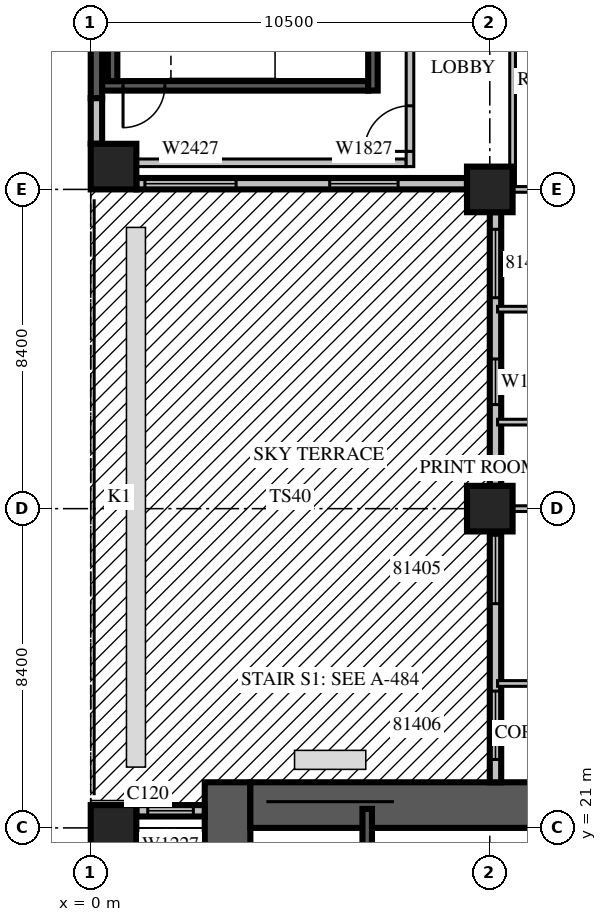
"""IFC4 building model, lengths in metres.
Left out: names, types, materials, properties, quantities, classifications, styles, units other than length and angle.
Written with IfcOpenShell. Run it as: python <this file> out.ifc"""

import sys

from ifc_helpers import new_model, si_unit, direction, frame, frame_2d, origin, origin_2d, place, context, subcontext, project, spatial, rectangle, extrude, source, transform, mapped, element, fill, save


model = new_model("IFC4")
c1 = context("Model", 3, precision=1e-05, world=origin(), true_north=direction((0.0, 1.0)))
c2 = subcontext(c1, "Body", "Model", "MODEL_VIEW")
j1 = project(units=[si_unit("LENGTHUNIT", "METRE"), si_unit("PLANEANGLEUNIT", "RADIAN")], contexts=[c1])
p1 = place(None, origin())
s1 = spatial("IfcSite", under=j1, at=p1, CompositionType="ELEMENT")
p2 = place(p1, origin())
s2 = spatial("IfcBuilding", under=s1, at=p2, CompositionType="ELEMENT")
p3 = place(p2, frame((0.0, 0.0, 69.9)))
s3 = spatial("IfcBuildingStorey", under=s2, at=p3, CompositionType="ELEMENT", Elevation=69.9)
m1 = source(origin(), c2, "Body", "SweptSolid", [
    extrude(rectangle(XDim=1.2, YDim=1.2, at=origin_2d()), origin(), (0.0, 0.0, 1.0), 4.2),
])
for number, where, z_axis, x_axis in (
    (1, (0.6, 21.0, 0.0), (0.0, 0.0, 1.0), (1.0, 0.0, 0.0)),
    (2, (10.5, 29.4, 0.0), (0.0, 0.0, 1.0), (1.0, 0.0, 0.0)),
    (3, (0.6, 38.4, 0.0), (0.0, 0.0, 1.0), (1.0, 0.0, 0.0)),
    (4, (10.5, 37.8, 0.0), (0.0, 0.0, 1.0), (1.0, 0.0, 0.0)),
):
    element("IfcColumn", number, at=place(p3, frame(where, z_axis=z_axis, x_axis=x_axis)), inside=s3, PredefinedType="COLUMN", context=c2, shape_type="MappedRepresentation", body=[
        mapped(m1, transform((0.0, 0.0, 0.0), scale=1.0)),
    ])
m2 = source(origin(), c2, "Body", "SweptSolid", [
    extrude(rectangle(XDim=18.0, YDim=1.2, at=frame_2d((9.0, 0.0))), origin(), (0.0, 0.0, 1.0), 4.2),
])
p4 = place(p3, frame((3.6, 4.2, 0.0), z_axis=(0.0, 0.0, 1.0), x_axis=(0.0, 1.0, 0.0)))
e5 = element("IfcWall", 5, at=p4, inside=s3, PredefinedType="SHEAR", context=c2, shape_type="MappedRepresentation", body=[
    mapped(m2, transform((0.0, 0.0, 0.0), scale=1.0)),
])
m3 = source(origin(), c2, "Body", "SweptSolid", [
    extrude(rectangle(XDim=2.2, YDim=2.1, at=frame_2d((1.1, 1.05))), frame((0.0, 0.61, 0.0), z_axis=(0.0, -1.0, 0.0), x_axis=(1.0, 0.0, 0.0)), (0.0, 0.0, 1.0), 1.22),
])
p5 = place(p4, frame((4.2, 0.0, 0.0)))
e6 = element("IfcOpeningElement", 6, at=p5, cuts=e5, PredefinedType="OPENING", context=c2, shape_type="MappedRepresentation", body=[
    mapped(m3, transform((0.0, 0.0, 0.0), scale=1.0)),
])
m4 = source(origin(), c2, "Body", "SweptSolid", [
    extrude(rectangle(XDim=16.8, YDim=1.2, at=frame_2d((8.4, 0.0))), origin(), (0.0, 0.0, 1.0), 4.2),
])
p6 = place(p3, frame((4.2, 21.6, 0.0), z_axis=(0.0, 0.0, 1.0), x_axis=(1.0, 0.0, 0.0)))
e7 = element("IfcWall", 7, at=p6, inside=s3, PredefinedType="SHEAR", context=c2, shape_type="MappedRepresentation", body=[
    mapped(m4, transform((0.0, 0.0, 0.0), scale=1.0)),
])
m5 = source(origin(), c2, "Body", "SweptSolid", [
    extrude(rectangle(XDim=1.2, YDim=2.1, at=frame_2d((0.6, 1.05))), frame((0.0, 0.61, 0.0), z_axis=(0.0, -1.0, 0.0), x_axis=(1.0, 0.0, 0.0)), (0.0, 0.0, 1.0), 1.22),
])
p7 = place(p6, frame((7.4, 0.0, 0.0)))
e8 = element("IfcOpeningElement", 8, at=p7, cuts=e7, PredefinedType="OPENING", context=c2, shape_type="MappedRepresentation", body=[
    mapped(m5, transform((0.0, 0.0, 0.0), scale=1.0)),
])
m6 = source(origin(), c2, "Body", "SweptSolid", [
    extrude(rectangle(XDim=3.8, YDim=0.3, at=frame_2d((1.9, 0.0))), origin(), (0.0, 0.0, 1.0), 3.8),
])
p8 = place(p3, frame((0.15, 44.0, 0.0), z_axis=(0.0, 0.0, 1.0), x_axis=(0.0, -1.0, 0.0)))
e9 = element("IfcWall", 9, at=p8, inside=s3, PredefinedType="SOLIDWALL", context=c2, shape_type="MappedRepresentation", body=[
    mapped(m6, transform((0.0, 0.0, 0.0), scale=1.0)),
])
m7 = source(origin(), c2, "Body", "SweptSolid", [
    extrude(rectangle(XDim=1.2, YDim=0.3, at=frame_2d((0.6, 0.0))), origin(), (0.0, 0.0, 1.0), 3.8),
])
p9 = place(p3, frame((0.15, 40.2, 0.0), z_axis=(0.0, 0.0, 1.0), x_axis=(0.0, -1.0, 0.0)))
e10 = element("IfcWall", 10, at=p9, inside=s3, PredefinedType="STANDARD", context=c2, shape_type="MappedRepresentation", body=[
    mapped(m7, transform((0.0, 0.0, 0.0), scale=1.0)),
])
m8 = source(origin(), c2, "Body", "SweptSolid", [
    extrude(rectangle(XDim=8.7, YDim=0.3, at=frame_2d((4.35, 0.0))), origin(), (0.0, 0.0, 1.0), 3.8),
])
p10 = place(p3, frame((1.2, 37.95, 0.0), z_axis=(0.0, 0.0, 1.0), x_axis=(1.0, 0.0, 0.0)))
e11 = element("IfcWall", 11, at=p10, inside=s3, PredefinedType="STANDARD", context=c2, shape_type="MappedRepresentation", body=[
    mapped(m8, transform((0.0, 0.0, 0.0), scale=1.0)),
])
m9 = source(origin(), c2, "Body", "SweptSolid", [
    extrude(rectangle(XDim=2.4, YDim=2.7, at=frame_2d((1.2, 1.35))), frame((0.0, 0.16, 0.0), z_axis=(0.0, -1.0, 0.0), x_axis=(1.0, 0.0, 0.0)), (0.0, 0.0, 1.0), 0.32),
])
p11 = place(p10, frame((0.225, 0.0, 0.6)))
e12 = element("IfcOpeningElement", 12, at=p11, cuts=e11, PredefinedType="OPENING", context=c2, shape_type="MappedRepresentation", body=[
    mapped(m9, transform((0.0, 0.0, 0.0), scale=1.0)),
])
m10 = source(origin(), c2, "Body", "SweptSolid", [
    extrude(rectangle(XDim=1.8, YDim=2.7, at=frame_2d((0.9, 1.35))), frame((0.0, 0.16, 0.0), z_axis=(0.0, -1.0, 0.0), x_axis=(1.0, 0.0, 0.0)), (0.0, 0.0, 1.0), 0.32),
])
p12 = place(p10, frame((5.088, 0.0, 0.6)))
e13 = element("IfcOpeningElement", 13, at=p12, cuts=e11, PredefinedType="OPENING", context=c2, shape_type="MappedRepresentation", body=[
    mapped(m10, transform((0.0, 0.0, 0.0), scale=1.0)),
])
m11 = source(origin(), c2, "Body", "SweptSolid", [
    extrude(rectangle(XDim=7.2, YDim=0.3, at=frame_2d((3.6, 0.0))), origin(), (0.0, 0.0, 1.0), 3.8),
])
p13 = place(p3, frame((10.65, 37.2, 0.0), z_axis=(0.0, 0.0, 1.0), x_axis=(0.0, -1.0, 0.0)))
e14 = element("IfcWall", 14, at=p13, inside=s3, PredefinedType="STANDARD", context=c2, shape_type="MappedRepresentation", body=[
    mapped(m11, transform((0.0, 0.0, 0.0), scale=1.0)),
])
m12 = source(origin(), c2, "Body", "SweptSolid", [
    extrude(rectangle(XDim=1.8, YDim=2.4, at=frame_2d((0.9, 1.2))), frame((0.0, 0.16, 0.0), z_axis=(0.0, -1.0, 0.0), x_axis=(1.0, 0.0, 0.0)), (0.0, 0.0, 1.0), 0.32),
])
p14 = place(p13, frame((0.45, 0.0, 0.0)))
e15 = element("IfcOpeningElement", 15, at=p14, cuts=e14, PredefinedType="OPENING", context=c2, shape_type="MappedRepresentation", body=[
    mapped(m12, transform((0.0, 0.0, 0.0), scale=1.0)),
])
m13 = source(origin(), c2, "Body", "SweptSolid", [
    extrude(rectangle(XDim=1.2, YDim=2.7, at=frame_2d((0.6, 1.35))), frame((0.0, 0.16, 0.0), z_axis=(0.0, -1.0, 0.0), x_axis=(1.0, 0.0, 0.0)), (0.0, 0.0, 1.0), 0.32),
])
p15 = place(p13, frame((3.861, 0.0, 0.6)))
e16 = element("IfcOpeningElement", 16, at=p15, cuts=e14, PredefinedType="OPENING", context=c2, shape_type="MappedRepresentation", body=[
    mapped(m13, transform((0.0, 0.0, 0.0), scale=1.0)),
])
m14 = source(origin(), c2, "Body", "SweptSolid", [
    extrude(rectangle(XDim=6.6, YDim=0.3, at=frame_2d((3.3, 0.0))), origin(), (0.0, 0.0, 1.0), 3.8),
])
p16 = place(p3, frame((10.65, 28.8, 0.0), z_axis=(0.0, 0.0, 1.0), x_axis=(0.0, -1.0, 0.0)))
e17 = element("IfcWall", 17, at=p16, inside=s3, PredefinedType="STANDARD", context=c2, shape_type="MappedRepresentation", body=[
    mapped(m14, transform((0.0, 0.0, 0.0), scale=1.0)),
])
p17 = place(p16, frame((0.1, 0.0, 0.0)))
e18 = element("IfcOpeningElement", 18, at=p17, cuts=e17, PredefinedType="OPENING", context=c2, shape_type="MappedRepresentation", body=[
    mapped(m12, transform((0.0, 0.0, 0.0), scale=1.0)),
])
p18 = place(p16, frame((4.2, 0.0, 0.0)))
e19 = element("IfcOpeningElement", 19, at=p18, cuts=e17, PredefinedType="OPENING", context=c2, shape_type="MappedRepresentation", body=[
    mapped(m12, transform((0.0, 0.0, 0.0), scale=1.0)),
])
m15 = source(origin(), c2, "Body", "SweptSolid", [
    extrude(rectangle(XDim=1.8, YDim=0.3, at=frame_2d((0.9, 0.0))), origin(), (0.0, 0.0, 1.0), 3.8),
])
p19 = place(p3, frame((3.0, 21.45, 0.0), z_axis=(0.0, 0.0, 1.0), x_axis=(-1.0, 0.0, 0.0)))
e20 = element("IfcWall", 20, at=p19, inside=s3, PredefinedType="STANDARD", context=c2, shape_type="MappedRepresentation", body=[
    mapped(m15, transform((0.0, 0.0, 0.0), scale=1.0)),
])
p20 = place(p19, frame((0.3, 0.0, 0.6)))
e21 = element("IfcOpeningElement", 21, at=p20, cuts=e20, PredefinedType="OPENING", context=c2, shape_type="MappedRepresentation", body=[
    mapped(m13, transform((0.0, 0.0, 0.0), scale=1.0)),
])
m16 = source(origin(), c2, "Body", "SweptSolid", [
    extrude(rectangle(XDim=6.6, YDim=0.25, at=frame_2d((3.3, 0.0))), origin(), (0.0, 0.0, 1.0), 3.8),
])
p21 = place(p3, frame((7.275, 14.9, 0.0), z_axis=(0.0, 0.0, 1.0), x_axis=(0.0, 1.0, 0.0)))
e22 = element("IfcWall", 22, at=p21, inside=s3, PredefinedType="SOLIDWALL", context=c2, shape_type="MappedRepresentation", body=[
    mapped(m16, transform((0.0, 0.0, 0.0), scale=1.0)),
])
m17 = source(origin(), c2, "Body", "SweptSolid", [
    extrude(rectangle(XDim=1.1, YDim=2.1, at=frame_2d((0.55, 1.05))), frame((0.0, 0.135, 0.0), z_axis=(0.0, -1.0, 0.0), x_axis=(1.0, 0.0, 0.0)), (0.0, 0.0, 1.0), 0.27),
])
p22 = place(p21, frame((0.15, 0.0, 0.0)))
e23 = element("IfcOpeningElement", 23, at=p22, cuts=e22, PredefinedType="OPENING", context=c2, shape_type="MappedRepresentation", body=[
    mapped(m17, transform((0.0, 0.0, 0.0), scale=1.0)),
])
m18 = source(origin(), c2, "Body", "SweptSolid", [
    extrude(rectangle(XDim=7.0, YDim=0.25, at=frame_2d((3.5, 0.0))), origin(), (0.0, 0.0, 1.0), 3.8),
])
p23 = place(p3, frame((0.3, 40.525, 0.0), z_axis=(0.0, 0.0, 1.0), x_axis=(1.0, 0.0, 0.0)))
e24 = element("IfcWall", 24, at=p23, inside=s3, PredefinedType="SOLIDWALL", context=c2, shape_type="MappedRepresentation", body=[
    mapped(m18, transform((0.0, 0.0, 0.0), scale=1.0)),
])
p24 = place(p23, frame((0.55, 0.0, 0.0)))
e25 = element("IfcOpeningElement", 25, at=p24, cuts=e24, PredefinedType="OPENING", context=c2, shape_type="MappedRepresentation", body=[
    mapped(m17, transform((0.0, 0.0, 0.0), scale=1.0)),
])
m19 = source(origin(), c2, "Body", "SweptSolid", [
    extrude(rectangle(XDim=3.45, YDim=0.25, at=frame_2d((1.725, 0.0))), origin(), (0.0, 0.0, 1.0), 3.8),
])
p25 = place(p3, frame((7.425, 40.4, 0.0), z_axis=(0.0, 0.0, 1.0), x_axis=(0.0, 1.0, 0.0)))
e26 = element("IfcWall", 26, at=p25, inside=s3, PredefinedType="SOLIDWALL", context=c2, shape_type="MappedRepresentation", body=[
    mapped(m19, transform((0.0, 0.0, 0.0), scale=1.0)),
])
m20 = source(origin(), c2, "Body", "SweptSolid", [
    extrude(rectangle(XDim=2.95, YDim=0.25, at=frame_2d((1.475, 0.0))), origin(), (0.0, 0.0, 1.0), 3.8),
])
p26 = place(p3, frame((0.575, 40.65, 0.0), z_axis=(0.0, 0.0, 1.0), x_axis=(0.0, 1.0, 0.0)))
e27 = element("IfcWall", 27, at=p26, inside=s3, PredefinedType="SOLIDWALL", context=c2, shape_type="MappedRepresentation", body=[
    mapped(m20, transform((0.0, 0.0, 0.0), scale=1.0)),
])
m21 = source(origin(), c2, "Body", "SweptSolid", [
    extrude(rectangle(XDim=8.0, YDim=0.2, at=frame_2d((4.0, 0.0))), origin(), (0.0, 0.0, 1.0), 3.8),
])
p27 = place(p3, frame((0.3, 38.5, 0.0), z_axis=(0.0, 0.0, 1.0), x_axis=(1.0, 0.0, 0.0)))
e28 = element("IfcWall", 28, at=p27, inside=s3, PredefinedType="PARTITIONING", context=c2, shape_type="MappedRepresentation", body=[
    mapped(m21, transform((0.0, 0.0, 0.0), scale=1.0)),
])
m22 = source(origin(), c2, "Body", "SweptSolid", [
    extrude(rectangle(XDim=5.45, YDim=0.2, at=frame_2d((2.725, 0.0))), origin(), (0.0, 0.0, 1.0), 3.8),
])
p28 = place(p3, frame((8.4, 38.4, 0.0), z_axis=(0.0, 0.0, 1.0), x_axis=(0.0, 1.0, 0.0)))
e29 = element("IfcWall", 29, at=p28, inside=s3, PredefinedType="PARTITIONING", context=c2, shape_type="MappedRepresentation", body=[
    mapped(m22, transform((0.0, 0.0, 0.0), scale=1.0)),
])
m23 = source(origin(), c2, "Body", "SweptSolid", [
    extrude(rectangle(XDim=1.2, YDim=2.1, at=frame_2d((0.6, 1.05))), frame((0.0, 0.11, 0.0), z_axis=(0.0, -1.0, 0.0), x_axis=(1.0, 0.0, 0.0)), (0.0, 0.0, 1.0), 0.22),
])
p29 = place(p28, frame((0.4, 0.0, 0.0)))
e30 = element("IfcOpeningElement", 30, at=p29, cuts=e29, PredefinedType="OPENING", context=c2, shape_type="MappedRepresentation", body=[
    mapped(m23, transform((0.0, 0.0, 0.0), scale=1.0)),
])
m24 = source(origin(), c2, "Body", "SweptSolid", [
    extrude(rectangle(XDim=0.9, YDim=2.1, at=frame_2d((0.45, 1.05))), frame((0.0, 0.11, 0.0), z_axis=(0.0, -1.0, 0.0), x_axis=(1.0, 0.0, 0.0)), (0.0, 0.0, 1.0), 0.22),
])
p30 = place(p28, frame((3.25, 0.0, 0.0)))
e31 = element("IfcOpeningElement", 31, at=p30, cuts=e29, PredefinedType="OPENING", context=c2, shape_type="MappedRepresentation", body=[
    mapped(m24, transform((0.0, 0.0, 0.0), scale=1.0)),
])
m25 = source(origin(), c2, "Body", "SweptSolid", [
    extrude(rectangle(XDim=4.295, YDim=0.15, at=frame_2d((2.147, 0.0))), origin(), (0.0, 0.0, 1.0), 3.8),
])
p31 = place(p3, frame((10.705, 24.8, 0.0), z_axis=(0.0, 0.0, 1.0), x_axis=(1.0, 0.0, 0.0)))
e32 = element("IfcWall", 32, at=p31, inside=s3, PredefinedType="PARTITIONING", context=c2, shape_type="MappedRepresentation", body=[
    mapped(m25, transform((0.0, 0.0, 0.0), scale=1.0)),
])
m26 = source(origin(), c2, "Body", "SweptSolid", [
    extrude(rectangle(XDim=0.9, YDim=2.1, at=frame_2d((0.45, 1.05))), frame((0.0, 0.085, 0.0), z_axis=(0.0, -1.0, 0.0), x_axis=(1.0, 0.0, 0.0)), (0.0, 0.0, 1.0), 0.17),
])
p32 = place(p31, frame((2.283, 0.0, 0.0)))
e33 = element("IfcOpeningElement", 33, at=p32, cuts=e32, PredefinedType="OPENING", context=c2, shape_type="MappedRepresentation", body=[
    mapped(m26, transform((0.0, 0.0, 0.0), scale=1.0)),
])
m27 = source(origin(), c2, "Body", "SweptSolid", [
    extrude(rectangle(XDim=3.901, YDim=0.15, at=frame_2d((1.95, 0.0))), origin(), (0.0, 0.0, 1.0), 3.8),
])
p33 = place(p3, frame((15.0, 29.4, 0.0), z_axis=(0.0, 0.0, 1.0), x_axis=(-1.0, 0.0, 0.0)))
e34 = element("IfcWall", 34, at=p33, inside=s3, PredefinedType="PARTITIONING", context=c2, shape_type="MappedRepresentation", body=[
    mapped(m27, transform((0.0, 0.0, 0.0), scale=1.0)),
])
m28 = source(origin(), c2, "Body", "SweptSolid", [
    extrude(rectangle(XDim=6.45, YDim=0.15, at=frame_2d((3.225, 0.0))), origin(), (0.0, 0.0, 1.0), 3.8),
])
p34 = place(p3, frame((11.1, 44.325, 0.0), z_axis=(0.0, 0.0, 1.0), x_axis=(0.0, -1.0, 0.0)))
e35 = element("IfcWall", 35, at=p34, inside=s3, PredefinedType="PARTITIONING", context=c2, shape_type="MappedRepresentation", body=[
    mapped(m28, transform((0.0, 0.0, 0.0), scale=1.0)),
])
for number, where, z_axis, x_axis in (
    (36, (15.0, 31.677, 0.0), (0.0, 0.0, 1.0), (-1.0, 0.0, 0.0)),
    (37, (15.0, 34.648, 0.0), (0.0, 0.0, 1.0), (-1.0, 0.0, 0.0)),
):
    element("IfcWall", number, at=place(p3, frame(where, z_axis=z_axis, x_axis=x_axis)), inside=s3, PredefinedType="PARTITIONING", context=c2, shape_type="MappedRepresentation", body=[
        mapped(m25, transform((0.0, 0.0, 0.0), scale=1.0)),
    ])
p35 = place(p3, frame((15.0, 37.8, 0.0), z_axis=(0.0, 0.0, 1.0), x_axis=(-1.0, 0.0, 0.0)))
e38 = element("IfcWall", 38, at=p35, inside=s3, PredefinedType="PARTITIONING", context=c2, shape_type="MappedRepresentation", body=[
    mapped(m27, transform((0.0, 0.0, 0.0), scale=1.0)),
])
m29 = source(origin(), c2, "Body", "SweptSolid", [
    extrude(rectangle(XDim=2.4, YDim=2.7, at=frame_2d((1.2, 1.35))), frame((0.0, 0.03, 0.0), z_axis=(0.0, -1.0, 0.0), x_axis=(1.0, 0.0, 0.0)), (0.0, 0.0, 1.0), 0.06),
])
p36 = place(p11, origin())
e39 = element("IfcWindow", 39, at=p36, inside=s3, PartitioningType="SINGLE_PANEL", PredefinedType="WINDOW", context=c2, shape_type="MappedRepresentation", body=[
    mapped(m29, transform((0.0, 0.0, 0.0), scale=1.0)),
])
fill(e12, e39)
m30 = source(origin(), c2, "Body", "SweptSolid", [
    extrude(rectangle(XDim=1.8, YDim=2.7, at=frame_2d((0.9, 1.35))), frame((0.0, 0.03, 0.0), z_axis=(0.0, -1.0, 0.0), x_axis=(1.0, 0.0, 0.0)), (0.0, 0.0, 1.0), 0.06),
])
p37 = place(p12, origin())
e40 = element("IfcWindow", 40, at=p37, inside=s3, PartitioningType="SINGLE_PANEL", PredefinedType="WINDOW", context=c2, shape_type="MappedRepresentation", body=[
    mapped(m30, transform((0.0, 0.0, 0.0), scale=1.0)),
])
fill(e13, e40)
m31 = source(origin(), c2, "Body", "SweptSolid", [
    extrude(rectangle(XDim=1.8, YDim=2.4, at=frame_2d((0.9, 1.2))), frame((0.0, 0.025, 0.0), z_axis=(0.0, -1.0, 0.0), x_axis=(1.0, 0.0, 0.0)), (0.0, 0.0, 1.0), 0.05),
])
p38 = place(p14, origin())
e41 = element("IfcDoor", 41, at=p38, inside=s3, OperationType="SLIDING_TO_LEFT", PredefinedType="DOOR", context=c2, shape_type="MappedRepresentation", body=[
    mapped(m31, transform((0.0, 0.0, 0.0), scale=1.0)),
])
fill(e15, e41)
p39 = place(p17, origin())
e42 = element("IfcDoor", 42, at=p39, inside=s3, OperationType="SLIDING_TO_LEFT", PredefinedType="DOOR", context=c2, shape_type="MappedRepresentation", body=[
    mapped(m31, transform((0.0, 0.0, 0.0), scale=1.0)),
])
fill(e18, e42)
p40 = place(p18, origin())
e43 = element("IfcDoor", 43, at=p40, inside=s3, OperationType="SLIDING_TO_LEFT", PredefinedType="DOOR", context=c2, shape_type="MappedRepresentation", body=[
    mapped(m31, transform((0.0, 0.0, 0.0), scale=1.0)),
])
fill(e19, e43)
m32 = source(origin(), c2, "Body", "SweptSolid", [
    extrude(rectangle(XDim=1.2, YDim=2.7, at=frame_2d((0.6, 1.35))), frame((0.0, 0.03, 0.0), z_axis=(0.0, -1.0, 0.0), x_axis=(1.0, 0.0, 0.0)), (0.0, 0.0, 1.0), 0.06),
])
p41 = place(p15, origin())
e44 = element("IfcWindow", 44, at=p41, inside=s3, PartitioningType="SINGLE_PANEL", PredefinedType="WINDOW", context=c2, shape_type="MappedRepresentation", body=[
    mapped(m32, transform((0.0, 0.0, 0.0), scale=1.0)),
])
fill(e16, e44)
p42 = place(p20, origin())
e45 = element("IfcWindow", 45, at=p42, inside=s3, PartitioningType="SINGLE_PANEL", PredefinedType="WINDOW", context=c2, shape_type="MappedRepresentation", body=[
    mapped(m32, transform((0.0, 0.0, 0.0), scale=1.0)),
])
fill(e21, e45)
m33 = source(origin(), c2, "Body", "SweptSolid", [
    extrude(rectangle(XDim=1.1, YDim=2.1, at=frame_2d((0.55, 1.05))), frame((0.0, 0.025, 0.0), z_axis=(0.0, -1.0, 0.0), x_axis=(1.0, 0.0, 0.0)), (0.0, 0.0, 1.0), 0.05),
])
p43 = place(p24, origin())
e46 = element("IfcDoor", 46, at=p43, inside=s3, OperationType="SINGLE_SWING_RIGHT", PredefinedType="DOOR", context=c2, shape_type="MappedRepresentation", body=[
    mapped(m33, transform((0.0, 0.0, 0.0), scale=1.0)),
])
fill(e25, e46)
m34 = source(origin(), c2, "Body", "SweptSolid", [
    extrude(rectangle(XDim=1.2, YDim=2.1, at=frame_2d((0.6, 1.05))), frame((0.0, 0.025, 0.0), z_axis=(0.0, -1.0, 0.0), x_axis=(1.0, 0.0, 0.0)), (0.0, 0.0, 1.0), 0.05),
])
p44 = place(p29, origin())
e47 = element("IfcDoor", 47, at=p44, inside=s3, OperationType="SINGLE_SWING_LEFT", PredefinedType="DOOR", context=c2, shape_type="MappedRepresentation", body=[
    mapped(m34, transform((0.0, 0.0, 0.0), scale=1.0)),
])
fill(e30, e47)
save(model, sys.argv[1])
